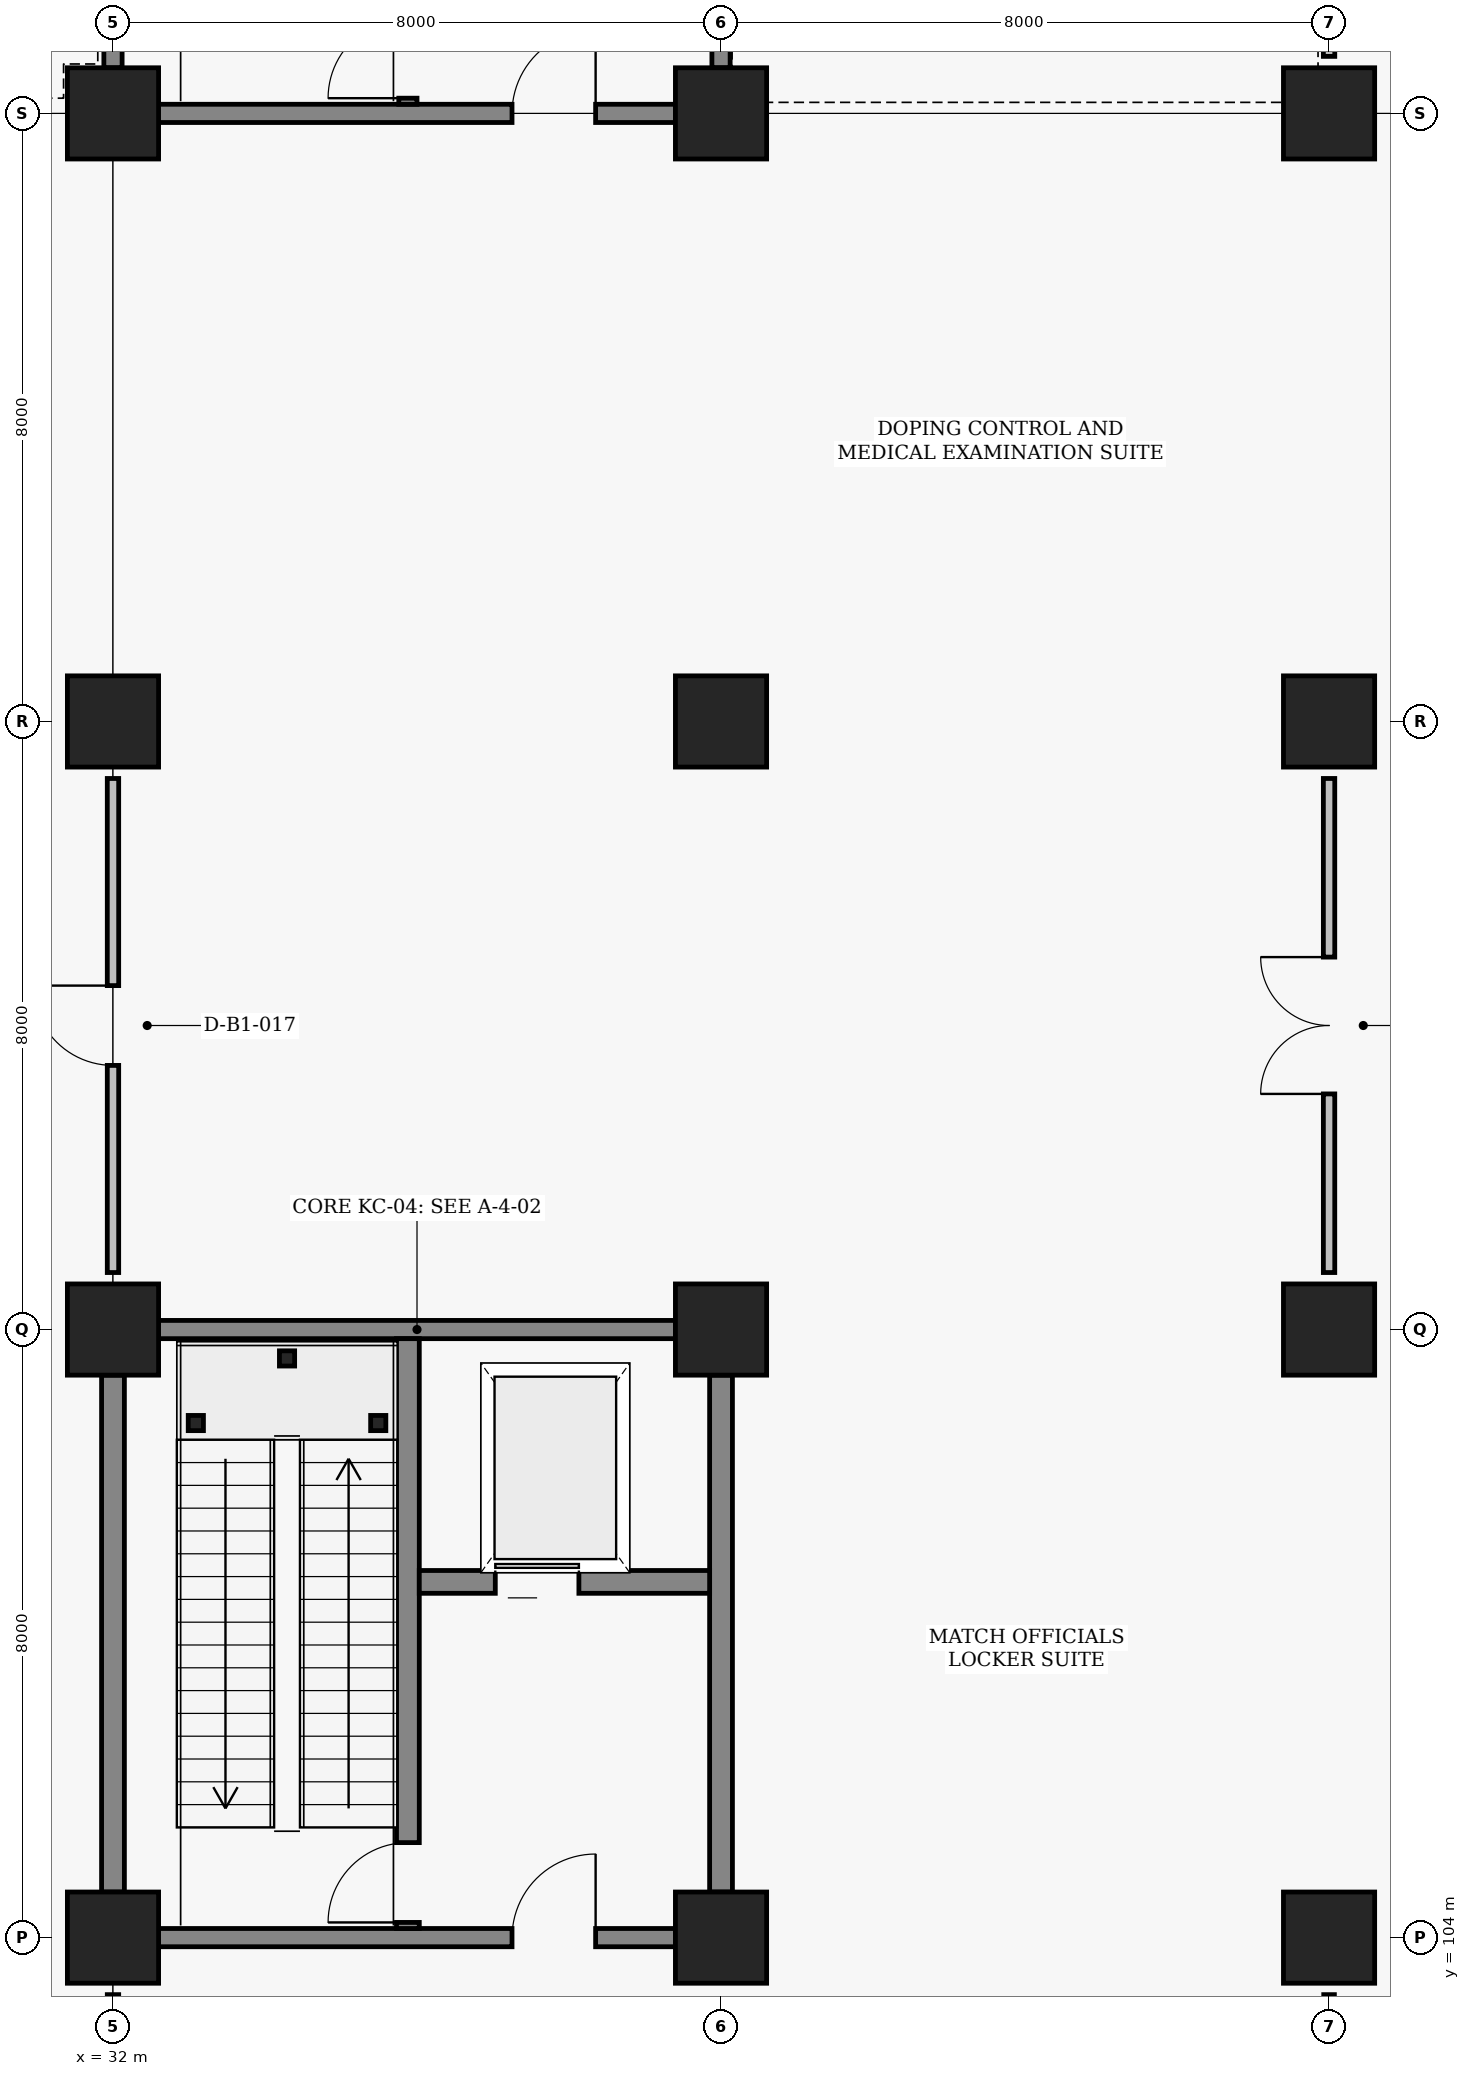
"""IFC4 building model, lengths in metres.
Left out: names, types, materials, properties, quantities, classifications, styles, units other than length and angle.
Written with IfcOpenShell. Run it as: python <this file> out.ifc"""

import sys

from ifc_helpers import new_model, si_unit, direction, frame, frame_2d, origin, origin_2d, place, context, subcontext, project, spatial, rectangle, hollow_rectangle, extrude, element, fill, save


model = new_model("IFC4")
c1 = context("Model", 3, precision=1e-05, world=origin(), true_north=direction((0.0, 1.0)))
c2 = subcontext(c1, "Body", "Model", "MODEL_VIEW")
j1 = project(units=[si_unit("LENGTHUNIT", "METRE"), si_unit("PLANEANGLEUNIT", "RADIAN")], contexts=[c1])
p1 = place(None, origin())
s1 = spatial("IfcSite", under=j1, at=p1, CompositionType="ELEMENT")
p2 = place(p1, origin())
s2 = spatial("IfcBuilding", under=s1, at=p2, CompositionType="ELEMENT")
p3 = place(p2, frame((0.0, 0.0, -5.4)))
s3 = spatial("IfcBuildingStorey", under=s2, at=p3, CompositionType="ELEMENT", Elevation=-5.4)
for number, where, z_axis, x_axis in (
    (1, (32.0, 104.0, 0.0), (0.0, 0.0, 1.0), (1.0, 0.0, 0.0)),
    (2, (32.0, 112.0, 0.0), (0.0, 0.0, 1.0), (1.0, 0.0, 0.0)),
    (3, (32.0, 120.0, 0.0), (0.0, 0.0, 1.0), (1.0, 0.0, 0.0)),
    (4, (32.0, 128.0, 0.0), (0.0, 0.0, 1.0), (1.0, 0.0, 0.0)),
    (5, (40.0, 104.0, 0.0), (0.0, 0.0, 1.0), (1.0, 0.0, 0.0)),
    (6, (40.0, 112.0, 0.0), (0.0, 0.0, 1.0), (1.0, 0.0, 0.0)),
    (7, (40.0, 120.0, 0.0), (0.0, 0.0, 1.0), (1.0, 0.0, 0.0)),
    (8, (40.0, 128.0, 0.0), (0.0, 0.0, 1.0), (1.0, 0.0, 0.0)),
    (9, (48.0, 104.0, 0.0), (0.0, 0.0, 1.0), (1.0, 0.0, 0.0)),
    (10, (48.0, 112.0, 0.0), (0.0, 0.0, 1.0), (1.0, 0.0, 0.0)),
    (11, (48.0, 120.0, 0.0), (0.0, 0.0, 1.0), (1.0, 0.0, 0.0)),
    (12, (48.0, 128.0, 0.0), (0.0, 0.0, 1.0), (1.0, 0.0, 0.0)),
):
    element("IfcColumn", number, at=place(p3, frame(where, z_axis=z_axis, x_axis=x_axis)), inside=s3, PredefinedType="COLUMN", context=c2, shape_type="SweptSolid", body=[
        extrude(rectangle(XDim=1.2, YDim=1.2, at=origin_2d()), origin(), (0.0, 0.0, 1.0), 5.4),
    ])
p4 = place(p3, frame((32.6, 104.0, 0.0), z_axis=(0.0, 0.0, 1.0), x_axis=(1.0, 0.0, 0.0)))
e13 = element("IfcWall", 13, at=p4, inside=s3, PredefinedType="SHEAR", context=c2, shape_type="SweptSolid", body=[
    extrude(rectangle(XDim=6.8, YDim=0.24, at=frame_2d((3.4, 0.0))), origin(), (0.0, 0.0, 1.0), 4.59),
])
p5 = place(p4, frame((4.65, 0.0, 0.0)))
e14 = element("IfcOpeningElement", 14, at=p5, cuts=e13, PredefinedType="OPENING", context=c2, shape_type="SweptSolid", body=[
    extrude(rectangle(XDim=1.1, YDim=2.2, at=frame_2d((0.55, 1.1))), frame((0.0, 0.13, 0.0), z_axis=(0.0, -1.0, 0.0), x_axis=(1.0, 0.0, 0.0)), (0.0, 0.0, 1.0), 0.26),
])
p6 = place(p3, frame((32.6, 112.0, 0.0), z_axis=(0.0, 0.0, 1.0), x_axis=(1.0, 0.0, 0.0)))
e15 = element("IfcWall", 15, at=p6, inside=s3, PredefinedType="SHEAR", context=c2, shape_type="SweptSolid", body=[
    extrude(rectangle(XDim=6.8, YDim=0.24, at=frame_2d((3.4, 0.0))), origin(), (0.0, 0.0, 1.0), 4.59),
])
for number, where, z_axis, x_axis in (
    (16, (32.0, 104.6, 0.0), (0.0, 0.0, 1.0), (0.0, 1.0, 0.0)),
    (17, (40.0, 104.6, 0.0), (0.0, 0.0, 1.0), (0.0, 1.0, 0.0)),
):
    element("IfcWall", number, at=place(p3, frame(where, z_axis=z_axis, x_axis=x_axis)), inside=s3, PredefinedType="SHEAR", context=c2, shape_type="SweptSolid", body=[
        extrude(rectangle(XDim=6.8, YDim=0.3, at=frame_2d((3.4, 0.0))), origin(), (0.0, 0.0, 1.0), 4.39),
    ])
p7 = place(p3, frame((35.88, 104.12, 0.0), z_axis=(0.0, 0.0, 1.0), x_axis=(0.0, 1.0, 0.0)))
e18 = element("IfcWall", 18, at=p7, inside=s3, PredefinedType="SHEAR", context=c2, shape_type="SweptSolid", body=[
    extrude(rectangle(XDim=7.76, YDim=0.3, at=frame_2d((3.88, 0.0))), origin(), (0.0, 0.0, 1.0), 4.59),
])
p8 = place(p7, frame((0.08, 0.0, 0.0)))
e19 = element("IfcOpeningElement", 19, at=p8, cuts=e18, PredefinedType="OPENING", context=c2, shape_type="SweptSolid", body=[
    extrude(rectangle(XDim=1.05, YDim=2.15, at=frame_2d((0.525, 1.075))), frame((0.0, 0.16, 0.0), z_axis=(0.0, -1.0, 0.0), x_axis=(1.0, 0.0, 0.0)), (0.0, 0.0, 1.0), 0.32),
])
p9 = place(p3, frame((36.03, 108.68, 0.0), z_axis=(0.0, 0.0, 1.0), x_axis=(1.0, 0.0, 0.0)))
e20 = element("IfcWall", 20, at=p9, inside=s3, PredefinedType="SHEAR", context=c2, shape_type="SweptSolid", body=[
    extrude(rectangle(XDim=3.82, YDim=0.3, at=frame_2d((1.91, 0.0))), origin(), (0.0, 0.0, 1.0), 4.39),
])
p10 = place(p9, frame((1.0, 0.0, 0.0)))
e21 = element("IfcOpeningElement", 21, at=p10, cuts=e20, PredefinedType="OPENING", context=c2, shape_type="SweptSolid", body=[
    extrude(rectangle(XDim=1.1, YDim=2.15, at=frame_2d((0.55, 1.075))), frame((0.0, 0.16, 0.0), z_axis=(0.0, -1.0, 0.0), x_axis=(1.0, 0.0, 0.0)), (0.0, 0.0, 1.0), 0.32),
])
for number, where, z_axis, x_axis in (
    (22, (33.09, 110.77, 0.0), (0.0, 0.0, 1.0), (1.0, 0.0, 0.0)),
    (23, (35.49, 110.77, 0.0), (0.0, 0.0, 1.0), (1.0, 0.0, 0.0)),
    (24, (34.29, 111.62, 0.0), (0.0, 0.0, 1.0), (1.0, 0.0, 0.0)),
):
    element("IfcColumn", number, at=place(p3, frame(where, z_axis=z_axis, x_axis=x_axis)), inside=s3, PredefinedType="COLUMN", context=c2, shape_type="SweptSolid", body=[
        extrude(hollow_rectangle(XDim=0.2, YDim=0.2, WallThickness=0.009, at=origin_2d()), origin(), (0.0, 0.0, 1.0), 2.5),
    ])
p11 = place(p3, frame((32.6, 128.0, 0.0), z_axis=(0.0, 0.0, 1.0), x_axis=(1.0, 0.0, 0.0)))
e25 = element("IfcWall", 25, at=p11, inside=s3, PredefinedType="SHEAR", context=c2, shape_type="SweptSolid", body=[
    extrude(rectangle(XDim=6.8, YDim=0.24, at=frame_2d((3.4, 0.0))), origin(), (0.0, 0.0, 1.0), 3.69),
])
p12 = place(p11, frame((4.65, 0.0, 0.0)))
e26 = element("IfcOpeningElement", 26, at=p12, cuts=e25, PredefinedType="OPENING", context=c2, shape_type="SweptSolid", body=[
    extrude(rectangle(XDim=1.1, YDim=2.2, at=frame_2d((0.55, 1.1))), frame((0.0, 0.13, 0.0), z_axis=(0.0, -1.0, 0.0), x_axis=(1.0, 0.0, 0.0)), (0.0, 0.0, 1.0), 0.26),
])
p13 = place(p3, frame((32.0, 128.6, 0.0), z_axis=(0.0, 0.0, 1.0), x_axis=(0.0, 1.0, 0.0)))
e27 = element("IfcWall", 27, at=p13, inside=s3, PredefinedType="SHEAR", context=c2, shape_type="SweptSolid", body=[
    extrude(rectangle(XDim=6.8, YDim=0.24, at=frame_2d((3.4, 0.0))), origin(), (0.0, 0.0, 1.0), 4.39),
])
p14 = place(p3, frame((40.0, 128.6, 0.0), z_axis=(0.0, 0.0, 1.0), x_axis=(0.0, 1.0, 0.0)))
e28 = element("IfcWall", 28, at=p14, inside=s3, PredefinedType="SHEAR", context=c2, shape_type="SweptSolid", body=[
    extrude(rectangle(XDim=6.8, YDim=0.24, at=frame_2d((3.4, 0.0))), origin(), (0.0, 0.0, 1.0), 3.69),
])
p15 = place(p3, frame((35.88, 128.12, 0.0), z_axis=(0.0, 0.0, 1.0), x_axis=(0.0, 1.0, 0.0)))
e29 = element("IfcWall", 29, at=p15, inside=s3, PredefinedType="SHEAR", context=c2, shape_type="SweptSolid", body=[
    extrude(rectangle(XDim=7.76, YDim=0.24, at=frame_2d((3.88, 0.0))), origin(), (0.0, 0.0, 1.0), 4.59),
])
p16 = place(p15, frame((0.08, 0.0, 0.0)))
e30 = element("IfcOpeningElement", 30, at=p16, cuts=e29, PredefinedType="OPENING", context=c2, shape_type="SweptSolid", body=[
    extrude(rectangle(XDim=1.05, YDim=2.15, at=frame_2d((0.525, 1.075))), frame((0.0, 0.13, 0.0), z_axis=(0.0, -1.0, 0.0), x_axis=(1.0, 0.0, 0.0)), (0.0, 0.0, 1.0), 0.26),
])
p17 = place(p3, frame((32.0, 96.75, 0.0), z_axis=(0.0, 0.0, 1.0), x_axis=(0.0, 1.0, 0.0)))
e31 = element("IfcWall", 31, at=p17, inside=s3, PredefinedType="PARTITIONING", context=c2, shape_type="SweptSolid", body=[
    extrude(rectangle(XDim=6.5, YDim=0.15, at=frame_2d((3.25, 0.0))), origin(), (0.0, 0.0, 1.0), 4.39),
])
p18 = place(p17, frame((2.725, 0.0, 0.0)))
e32 = element("IfcOpeningElement", 32, at=p18, cuts=e31, PredefinedType="OPENING", context=c2, shape_type="SweptSolid", body=[
    extrude(rectangle(XDim=1.05, YDim=2.15, at=frame_2d((0.525, 1.075))), frame((0.0, 0.085, 0.0), z_axis=(0.0, -1.0, 0.0), x_axis=(1.0, 0.0, 0.0)), (0.0, 0.0, 1.0), 0.17),
])
p19 = place(p3, frame((32.0, 112.75, 0.0), z_axis=(0.0, 0.0, 1.0), x_axis=(0.0, 1.0, 0.0)))
e33 = element("IfcWall", 33, at=p19, inside=s3, PredefinedType="PARTITIONING", context=c2, shape_type="SweptSolid", body=[
    extrude(rectangle(XDim=6.5, YDim=0.15, at=frame_2d((3.25, 0.0))), origin(), (0.0, 0.0, 1.0), 4.39),
])
p20 = place(p19, frame((2.725, 0.0, 0.0)))
e34 = element("IfcOpeningElement", 34, at=p20, cuts=e33, PredefinedType="OPENING", context=c2, shape_type="SweptSolid", body=[
    extrude(rectangle(XDim=1.05, YDim=2.15, at=frame_2d((0.525, 1.075))), frame((0.0, 0.085, 0.0), z_axis=(0.0, -1.0, 0.0), x_axis=(1.0, 0.0, 0.0)), (0.0, 0.0, 1.0), 0.17),
])
p21 = place(p3, frame((48.0, 96.75, 0.0), z_axis=(0.0, 0.0, 1.0), x_axis=(0.0, 1.0, 0.0)))
e35 = element("IfcWall", 35, at=p21, inside=s3, PredefinedType="MOVABLE", context=c2, shape_type="SweptSolid", body=[
    extrude(rectangle(XDim=6.5, YDim=0.14, at=frame_2d((3.25, 0.0))), origin(), (0.0, 0.0, 1.0), 4.39),
])
p22 = place(p21, frame((2.75, 0.0, 0.0)))
e36 = element("IfcOpeningElement", 36, at=p22, cuts=e35, PredefinedType="OPENING", context=c2, shape_type="SweptSolid", body=[
    extrude(rectangle(XDim=1.0, YDim=2.1, at=frame_2d((0.5, 1.05))), frame((0.0, 0.08, 0.0), z_axis=(0.0, -1.0, 0.0), x_axis=(1.0, 0.0, 0.0)), (0.0, 0.0, 1.0), 0.16),
])
p23 = place(p3, frame((48.0, 112.75, 0.0), z_axis=(0.0, 0.0, 1.0), x_axis=(0.0, 1.0, 0.0)))
e37 = element("IfcWall", 37, at=p23, inside=s3, PredefinedType="PARTITIONING", context=c2, shape_type="SweptSolid", body=[
    extrude(rectangle(XDim=6.5, YDim=0.15, at=frame_2d((3.25, 0.0))), origin(), (0.0, 0.0, 1.0), 3.69),
])
p24 = place(p23, frame((2.35, 0.0, 0.0)))
e38 = element("IfcOpeningElement", 38, at=p24, cuts=e37, PredefinedType="OPENING", context=c2, shape_type="SweptSolid", body=[
    extrude(rectangle(XDim=1.8, YDim=2.3, at=frame_2d((0.9, 1.15))), frame((0.0, 0.085, 0.0), z_axis=(0.0, -1.0, 0.0), x_axis=(1.0, 0.0, 0.0)), (0.0, 0.0, 1.0), 0.17),
])
p25 = place(p3, frame((48.0, 128.75, 0.0), z_axis=(0.0, 0.0, 1.0), x_axis=(0.0, 1.0, 0.0)))
e39 = element("IfcWall", 39, at=p25, inside=s3, PredefinedType="PARTITIONING", context=c2, shape_type="SweptSolid", body=[
    extrude(rectangle(XDim=6.5, YDim=0.15, at=frame_2d((3.25, 0.0))), origin(), (0.0, 0.0, 1.0), 3.69),
])
p26 = place(p25, frame((2.725, 0.0, 0.0)))
e40 = element("IfcOpeningElement", 40, at=p26, cuts=e39, PredefinedType="OPENING", context=c2, shape_type="SweptSolid", body=[
    extrude(rectangle(XDim=1.05, YDim=2.15, at=frame_2d((0.525, 1.075))), frame((0.0, 0.085, 0.0), z_axis=(0.0, -1.0, 0.0), x_axis=(1.0, 0.0, 0.0)), (0.0, 0.0, 1.0), 0.17),
])
p27 = place(p5, origin())
e41 = element("IfcDoor", 41, at=p27, inside=s3, OperationType="SINGLE_SWING_RIGHT", PredefinedType="DOOR", context=c2, shape_type="SweptSolid", body=[
    extrude(rectangle(XDim=1.1, YDim=2.2, at=frame_2d((0.55, 1.1))), frame((0.0, 0.025, 0.0), z_axis=(0.0, -1.0, 0.0), x_axis=(1.0, 0.0, 0.0)), (0.0, 0.0, 1.0), 0.05),
])
fill(e14, e41)
p28 = place(p8, origin())
e42 = element("IfcDoor", 42, at=p28, inside=s3, OperationType="SINGLE_SWING_LEFT", PredefinedType="DOOR", context=c2, shape_type="SweptSolid", body=[
    extrude(rectangle(XDim=1.05, YDim=2.15, at=frame_2d((0.525, 1.075))), frame((0.0, 0.025, 0.0), z_axis=(0.0, -1.0, 0.0), x_axis=(1.0, 0.0, 0.0)), (0.0, 0.0, 1.0), 0.05),
])
fill(e19, e42)
p29 = place(p10, origin())
e43 = element("IfcDoor", 43, at=p29, inside=s3, OperationType="SLIDING_TO_LEFT", PredefinedType="DOOR", context=c2, shape_type="SweptSolid", body=[
    extrude(rectangle(XDim=1.1, YDim=2.15, at=frame_2d((0.55, 1.075))), frame((0.0, 0.025, 0.0), z_axis=(0.0, -1.0, 0.0), x_axis=(1.0, 0.0, 0.0)), (0.0, 0.0, 1.0), 0.05),
])
fill(e21, e43)
p30 = place(p12, origin())
e44 = element("IfcDoor", 44, at=p30, inside=s3, OperationType="SINGLE_SWING_RIGHT", PredefinedType="DOOR", context=c2, shape_type="SweptSolid", body=[
    extrude(rectangle(XDim=1.1, YDim=2.2, at=frame_2d((0.55, 1.1))), frame((0.0, 0.025, 0.0), z_axis=(0.0, -1.0, 0.0), x_axis=(1.0, 0.0, 0.0)), (0.0, 0.0, 1.0), 0.05),
])
fill(e26, e44)
p31 = place(p16, origin())
e45 = element("IfcDoor", 45, at=p31, inside=s3, OperationType="SINGLE_SWING_LEFT", PredefinedType="DOOR", context=c2, shape_type="SweptSolid", body=[
    extrude(rectangle(XDim=1.05, YDim=2.15, at=frame_2d((0.525, 1.075))), frame((0.0, 0.025, 0.0), z_axis=(0.0, -1.0, 0.0), x_axis=(1.0, 0.0, 0.0)), (0.0, 0.0, 1.0), 0.05),
])
fill(e30, e45)
p32 = place(p20, origin())
e46 = element("IfcDoor", 46, at=p32, inside=s3, OperationType="SINGLE_SWING_RIGHT", PredefinedType="DOOR", context=c2, shape_type="SweptSolid", body=[
    extrude(rectangle(XDim=1.05, YDim=2.15, at=frame_2d((0.525, 1.075))), frame((0.0, 0.025, 0.0), z_axis=(0.0, -1.0, 0.0), x_axis=(1.0, 0.0, 0.0)), (0.0, 0.0, 1.0), 0.05),
])
fill(e34, e46)
p33 = place(p24, origin())
e47 = element("IfcDoor", 47, at=p33, inside=s3, OperationType="DOUBLE_SWING_LEFT", PredefinedType="DOOR", context=c2, shape_type="SweptSolid", body=[
    extrude(rectangle(XDim=1.8, YDim=2.3, at=frame_2d((0.9, 1.15))), frame((0.0, 0.025, 0.0), z_axis=(0.0, -1.0, 0.0), x_axis=(1.0, 0.0, 0.0)), (0.0, 0.0, 1.0), 0.05),
])
fill(e38, e47)
save(model, sys.argv[1])
